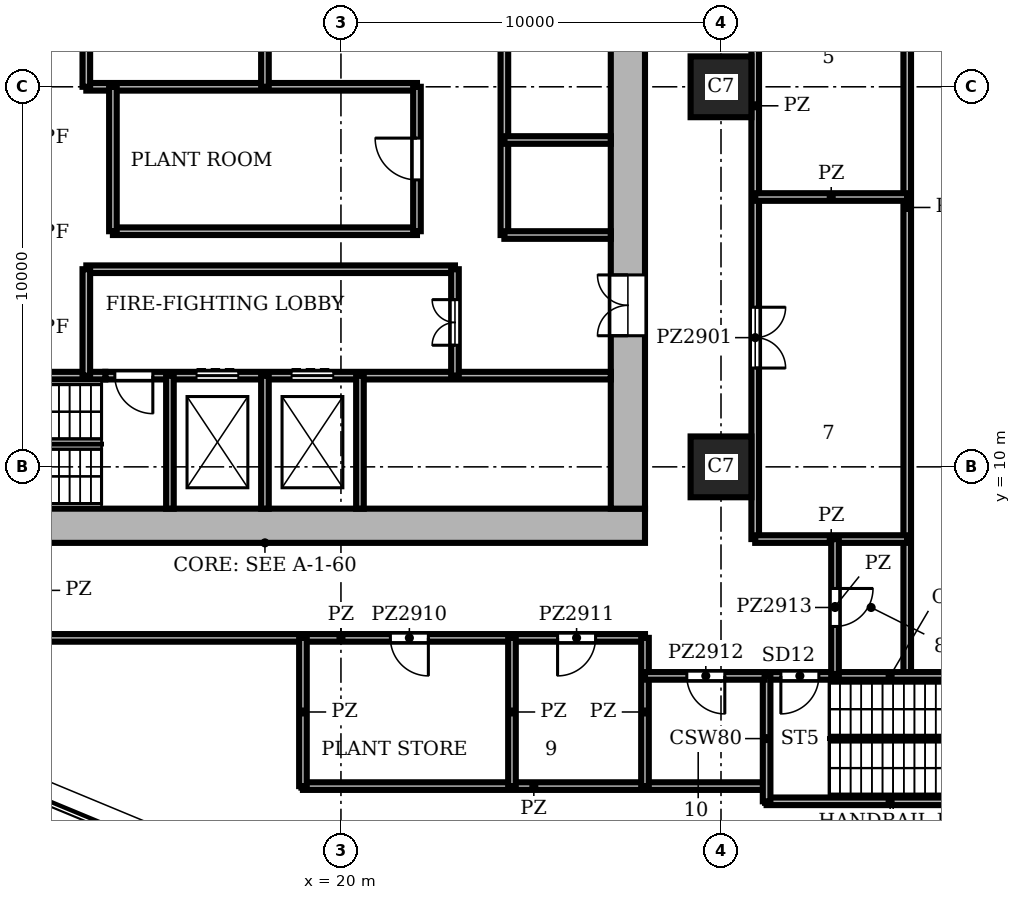
"""IFC4 building model, lengths in metres.
Left out: names, types, materials, properties, quantities, classifications, styles, units other than length and angle.
Written with IfcOpenShell. Run it as: python <this file> out.ifc"""

import sys

from ifc_helpers import new_model, si_unit, direction, frame, frame_2d, origin, origin_2d, place, context, subcontext, project, spatial, rectangle, extrude, element, fill, save


model = new_model("IFC4")
c1 = context("Model", 3, precision=1e-05, world=origin(), true_north=direction((0.0, 1.0)))
c2 = subcontext(c1, "Body", "Model", "MODEL_VIEW")
j1 = project(units=[si_unit("LENGTHUNIT", "METRE"), si_unit("PLANEANGLEUNIT", "RADIAN")], contexts=[c1])
p1 = place(None, origin())
s1 = spatial("IfcSite", under=j1, at=p1, CompositionType="ELEMENT")
p2 = place(p1, origin())
s2 = spatial("IfcBuilding", under=s1, at=p2, CompositionType="ELEMENT")
p3 = place(p2, frame((0.0, 0.0, 117.3)))
s3 = spatial("IfcBuildingStorey", under=s2, at=p3, CompositionType="ELEMENT", Elevation=117.3)
for number, where, z_axis, x_axis in (
    (1, (30.0, 10.0, 0.0), (0.0, 0.0, 1.0), (1.0, 0.0, 0.0)),
    (2, (30.0, 20.0, 0.0), (0.0, 0.0, 1.0), (1.0, 0.0, 0.0)),
):
    element("IfcColumn", number, at=place(p3, frame(where, z_axis=z_axis, x_axis=x_axis)), inside=s3, PredefinedType="COLUMN", context=c2, shape_type="SweptSolid", body=[
        extrude(rectangle(XDim=1.6, YDim=1.6, at=origin_2d()), origin(), (0.0, 0.0, 1.0), 9.0),
    ])
p4 = place(p3, frame((8.0, 8.45, 0.0), z_axis=(0.0, 0.0, 1.0), x_axis=(1.0, 0.0, 0.0)))
e3 = element("IfcWall", 3, at=p4, inside=s3, PredefinedType="SHEAR", context=c2, shape_type="SweptSolid", body=[
    extrude(rectangle(XDim=20.0, YDim=0.9, at=frame_2d((10.0, 0.0))), origin(), (0.0, 0.0, 1.0), 9.0),
])
p5 = place(p3, frame((27.55, 8.9, 0.0), z_axis=(0.0, 0.0, 1.0), x_axis=(0.0, 1.0, 0.0)))
e4 = element("IfcWall", 4, at=p5, inside=s3, PredefinedType="SHEAR", context=c2, shape_type="SweptSolid", body=[
    extrude(rectangle(XDim=18.2, YDim=0.9, at=frame_2d((9.1, 0.0))), origin(), (0.0, 0.0, 1.0), 9.0),
])
p6 = place(p5, frame((4.55, 0.0, 0.0)))
e5 = element("IfcOpeningElement", 5, at=p6, cuts=e4, PredefinedType="OPENING", context=c2, shape_type="SweptSolid", body=[
    extrude(rectangle(XDim=1.6, YDim=2.1, at=frame_2d((0.8, 1.05))), frame((0.0, 0.46, 0.0), z_axis=(0.0, -1.0, 0.0), x_axis=(1.0, 0.0, 0.0)), (0.0, 0.0, 1.0), 0.92),
])
p7 = place(p3, frame((31.2, 1.2, 0.0), z_axis=(0.0, 0.0, 1.0), x_axis=(1.0, 0.0, 0.0)))
e6 = element("IfcWall", 6, at=p7, inside=s3, PredefinedType="SHEAR", context=c2, shape_type="SweptSolid", body=[
    extrude(rectangle(XDim=6.5, YDim=0.2, at=frame_2d((3.25, 0.0))), origin(), (0.0, 0.0, 1.0), 8.55),
])
p8 = place(p3, frame((31.2, 4.5, 0.0), z_axis=(0.0, 0.0, 1.0), x_axis=(1.0, 0.0, 0.0)))
e7 = element("IfcWall", 7, at=p8, inside=s3, PredefinedType="SHEAR", context=c2, shape_type="SweptSolid", body=[
    extrude(rectangle(XDim=6.5, YDim=0.2, at=frame_2d((3.25, 0.0))), origin(), (0.0, 0.0, 1.0), 8.55),
])
p9 = place(p8, frame((0.375, 0.0, 0.0)))
e8 = element("IfcOpeningElement", 8, at=p9, cuts=e7, PredefinedType="OPENING", context=c2, shape_type="SweptSolid", body=[
    extrude(rectangle(XDim=1.0, YDim=2.1, at=frame_2d((0.5, 1.05))), frame((0.0, 0.11, 0.0), z_axis=(0.0, -1.0, 0.0), x_axis=(1.0, 0.0, 0.0)), (0.0, 0.0, 1.0), 0.22),
])
p10 = place(p3, frame((8.9, 12.4, 0.0), z_axis=(0.0, 0.0, 1.0), x_axis=(1.0, 0.0, 0.0)))
e9 = element("IfcWall", 9, at=p10, inside=s3, PredefinedType="SHEAR", context=c2, shape_type="SweptSolid", body=[
    extrude(rectangle(XDim=4.9, YDim=0.2, at=frame_2d((2.45, 0.0))), origin(), (0.0, 0.0, 1.0), 8.55),
])
p11 = place(p3, frame((13.8, 12.4, 0.0), z_axis=(0.0, 0.0, 1.0), x_axis=(1.0, 0.0, 0.0)))
e10 = element("IfcWall", 10, at=p11, inside=s3, PredefinedType="SHEAR", context=c2, shape_type="SweptSolid", body=[
    extrude(rectangle(XDim=13.3, YDim=0.2, at=frame_2d((6.65, 0.0))), origin(), (0.0, 0.0, 1.0), 8.55),
])
p12 = place(p11, frame((2.4, 0.0, 0.0)))
e11 = element("IfcOpeningElement", 11, at=p12, cuts=e10, PredefinedType="OPENING", context=c2, shape_type="SweptSolid", body=[
    extrude(rectangle(XDim=1.1, YDim=2.1, at=frame_2d((0.55, 1.05))), frame((0.0, 0.11, 0.0), z_axis=(0.0, -1.0, 0.0), x_axis=(1.0, 0.0, 0.0)), (0.0, 0.0, 1.0), 0.22),
])
p13 = place(p11, frame((4.9, 0.0, 0.0)))
e12 = element("IfcOpeningElement", 12, at=p13, cuts=e10, PredefinedType="OPENING", context=c2, shape_type="SweptSolid", body=[
    extrude(rectangle(XDim=1.1, YDim=2.1, at=frame_2d((0.55, 1.05))), frame((0.0, 0.11, 0.0), z_axis=(0.0, -1.0, 0.0), x_axis=(1.0, 0.0, 0.0)), (0.0, 0.0, 1.0), 0.22),
])
p14 = place(p11, frame((0.25, 0.0, 0.0)))
e13 = element("IfcOpeningElement", 13, at=p14, cuts=e10, PredefinedType="OPENING", context=c2, shape_type="SweptSolid", body=[
    extrude(rectangle(XDim=1.0, YDim=2.1, at=frame_2d((0.5, 1.05))), frame((0.0, 0.11, 0.0), z_axis=(0.0, -1.0, 0.0), x_axis=(1.0, 0.0, 0.0)), (0.0, 0.0, 1.0), 0.22),
])
p15 = place(p3, frame((13.3, 15.2, 0.0), z_axis=(0.0, 0.0, 1.0), x_axis=(1.0, 0.0, 0.0)))
e14 = element("IfcWall", 14, at=p15, inside=s3, PredefinedType="SHEAR", context=c2, shape_type="SweptSolid", body=[
    extrude(rectangle(XDim=9.7, YDim=0.2, at=frame_2d((4.85, 0.0))), origin(), (0.0, 0.0, 1.0), 8.55),
])
p16 = place(p3, frame((24.3, 16.1, 0.0), z_axis=(0.0, 0.0, 1.0), x_axis=(1.0, 0.0, 0.0)))
e15 = element("IfcWall", 15, at=p16, inside=s3, PredefinedType="SHEAR", context=c2, shape_type="SweptSolid", body=[
    extrude(rectangle(XDim=2.8, YDim=0.2, at=frame_2d((1.4, 0.0))), origin(), (0.0, 0.0, 1.0), 8.55),
])
p17 = place(p3, frame((14.0, 16.2, 0.0), z_axis=(0.0, 0.0, 1.0), x_axis=(1.0, 0.0, 0.0)))
e16 = element("IfcWall", 16, at=p17, inside=s3, PredefinedType="SHEAR", context=c2, shape_type="SweptSolid", body=[
    extrude(rectangle(XDim=8.0, YDim=0.2, at=frame_2d((4.0, 0.0))), origin(), (0.0, 0.0, 1.0), 8.55),
])
p18 = place(p3, frame((24.3, 18.6, 0.0), z_axis=(0.0, 0.0, 1.0), x_axis=(1.0, 0.0, 0.0)))
e17 = element("IfcWall", 17, at=p18, inside=s3, PredefinedType="SHEAR", context=c2, shape_type="SweptSolid", body=[
    extrude(rectangle(XDim=2.8, YDim=0.2, at=frame_2d((1.4, 0.0))), origin(), (0.0, 0.0, 1.0), 8.55),
])
p19 = place(p3, frame((13.3, 20.0, 0.0), z_axis=(0.0, 0.0, 1.0), x_axis=(1.0, 0.0, 0.0)))
e18 = element("IfcWall", 18, at=p19, inside=s3, PredefinedType="SHEAR", context=c2, shape_type="SweptSolid", body=[
    extrude(rectangle(XDim=8.7, YDim=0.2, at=frame_2d((4.35, 0.0))), origin(), (0.0, 0.0, 1.0), 8.55),
])
p20 = place(p3, frame((13.3, 12.4, 0.0), z_axis=(0.0, 0.0, 1.0), x_axis=(0.0, 1.0, 0.0)))
e19 = element("IfcWall", 19, at=p20, inside=s3, PredefinedType="SHEAR", context=c2, shape_type="SweptSolid", body=[
    extrude(rectangle(XDim=2.8, YDim=0.2, at=frame_2d((1.4, 0.0))), origin(), (0.0, 0.0, 1.0), 8.55),
])
p21 = place(p3, frame((13.3, 20.0, 0.0), z_axis=(0.0, 0.0, 1.0), x_axis=(0.0, 1.0, 0.0)))
e20 = element("IfcWall", 20, at=p21, inside=s3, PredefinedType="SHEAR", context=c2, shape_type="SweptSolid", body=[
    extrude(rectangle(XDim=3.6, YDim=0.2, at=frame_2d((1.8, 0.0))), origin(), (0.0, 0.0, 1.0), 8.55),
])
p22 = place(p3, frame((14.0, 16.2, 0.0), z_axis=(0.0, 0.0, 1.0), x_axis=(0.0, 1.0, 0.0)))
e21 = element("IfcWall", 21, at=p22, inside=s3, PredefinedType="SHEAR", context=c2, shape_type="SweptSolid", body=[
    extrude(rectangle(XDim=3.8, YDim=0.2, at=frame_2d((1.9, 0.0))), origin(), (0.0, 0.0, 1.0), 8.55),
])
for number, where, z_axis, x_axis in (
    (22, (15.5, 8.9, 0.0), (0.0, 0.0, 1.0), (0.0, 1.0, 0.0)),
    (23, (18.0, 8.9, 0.0), (0.0, 0.0, 1.0), (0.0, 1.0, 0.0)),
):
    element("IfcWall", number, at=place(p3, frame(where, z_axis=z_axis, x_axis=x_axis)), inside=s3, PredefinedType="SHEAR", context=c2, shape_type="SweptSolid", body=[
        extrude(rectangle(XDim=3.5, YDim=0.2, at=frame_2d((1.75, 0.0))), origin(), (0.0, 0.0, 1.0), 8.55),
    ])
p23 = place(p3, frame((18.0, 20.0, 0.0), z_axis=(0.0, 0.0, 1.0), x_axis=(0.0, 1.0, 0.0)))
e24 = element("IfcWall", 24, at=p23, inside=s3, PredefinedType="SHEAR", context=c2, shape_type="SweptSolid", body=[
    extrude(rectangle(XDim=7.1, YDim=0.2, at=frame_2d((3.55, 0.0))), origin(), (0.0, 0.0, 1.0), 8.55),
])
p24 = place(p23, frame((1.2, 0.0, 0.0)))
e25 = element("IfcOpeningElement", 25, at=p24, cuts=e24, PredefinedType="OPENING", context=c2, shape_type="SweptSolid", body=[
    extrude(rectangle(XDim=1.2, YDim=2.1, at=frame_2d((0.6, 1.05))), frame((0.0, 0.11, 0.0), z_axis=(0.0, -1.0, 0.0), x_axis=(1.0, 0.0, 0.0)), (0.0, 0.0, 1.0), 0.22),
])
p25 = place(p3, frame((20.5, 8.9, 0.0), z_axis=(0.0, 0.0, 1.0), x_axis=(0.0, 1.0, 0.0)))
e26 = element("IfcWall", 26, at=p25, inside=s3, PredefinedType="SHEAR", context=c2, shape_type="SweptSolid", body=[
    extrude(rectangle(XDim=3.5, YDim=0.2, at=frame_2d((1.75, 0.0))), origin(), (0.0, 0.0, 1.0), 8.55),
])
p26 = place(p3, frame((22.0, 16.2, 0.0), z_axis=(0.0, 0.0, 1.0), x_axis=(0.0, 1.0, 0.0)))
e27 = element("IfcWall", 27, at=p26, inside=s3, PredefinedType="SHEAR", context=c2, shape_type="SweptSolid", body=[
    extrude(rectangle(XDim=3.8, YDim=0.2, at=frame_2d((1.9, 0.0))), origin(), (0.0, 0.0, 1.0), 8.55),
])
p27 = place(p26, frame((1.35, 0.0, 0.0)))
e28 = element("IfcOpeningElement", 28, at=p27, cuts=e27, PredefinedType="OPENING", context=c2, shape_type="SweptSolid", body=[
    extrude(rectangle(XDim=1.1, YDim=2.1, at=frame_2d((0.55, 1.05))), frame((0.0, 0.11, 0.0), z_axis=(0.0, -1.0, 0.0), x_axis=(1.0, 0.0, 0.0)), (0.0, 0.0, 1.0), 0.22),
])
p28 = place(p3, frame((23.0, 12.4, 0.0), z_axis=(0.0, 0.0, 1.0), x_axis=(0.0, 1.0, 0.0)))
e29 = element("IfcWall", 29, at=p28, inside=s3, PredefinedType="SHEAR", context=c2, shape_type="SweptSolid", body=[
    extrude(rectangle(XDim=2.8, YDim=0.2, at=frame_2d((1.4, 0.0))), origin(), (0.0, 0.0, 1.0), 8.55),
])
p29 = place(p28, frame((0.8, 0.0, 0.0)))
e30 = element("IfcOpeningElement", 30, at=p29, cuts=e29, PredefinedType="OPENING", context=c2, shape_type="SweptSolid", body=[
    extrude(rectangle(XDim=1.2, YDim=2.1, at=frame_2d((0.6, 1.05))), frame((0.0, 0.11, 0.0), z_axis=(0.0, -1.0, 0.0), x_axis=(1.0, 0.0, 0.0)), (0.0, 0.0, 1.0), 0.22),
])
p30 = place(p3, frame((24.3, 16.1, 0.0), z_axis=(0.0, 0.0, 1.0), x_axis=(0.0, 1.0, 0.0)))
e31 = element("IfcWall", 31, at=p30, inside=s3, PredefinedType="SHEAR", context=c2, shape_type="SweptSolid", body=[
    extrude(rectangle(XDim=7.5, YDim=0.2, at=frame_2d((3.75, 0.0))), origin(), (0.0, 0.0, 1.0), 8.55),
])
p31 = place(p30, frame((5.7, 0.0, 0.0)))
e32 = element("IfcOpeningElement", 32, at=p31, cuts=e31, PredefinedType="OPENING", context=c2, shape_type="SweptSolid", body=[
    extrude(rectangle(XDim=1.1, YDim=2.1, at=frame_2d((0.55, 1.05))), frame((0.0, 0.11, 0.0), z_axis=(0.0, -1.0, 0.0), x_axis=(1.0, 0.0, 0.0)), (0.0, 0.0, 1.0), 0.22),
])
p32 = place(p3, frame((31.2, 1.2, 0.0), z_axis=(0.0, 0.0, 1.0), x_axis=(0.0, 1.0, 0.0)))
e33 = element("IfcWall", 33, at=p32, inside=s3, PredefinedType="SHEAR", context=c2, shape_type="SweptSolid", body=[
    extrude(rectangle(XDim=3.3, YDim=0.2, at=frame_2d((1.65, 0.0))), origin(), (0.0, 0.0, 1.0), 8.55),
])
p33 = place(p3, frame((12.0, 5.5, 0.0), z_axis=(0.0, 0.0, 1.0), x_axis=(1.0, 0.0, 0.0)))
e34 = element("IfcWall", 34, at=p33, inside=s3, PredefinedType="PARTITIONING", context=c2, shape_type="SweptSolid", body=[
    extrude(rectangle(XDim=16.0, YDim=0.2, at=frame_2d((8.0, 0.0))), origin(), (0.0, 0.0, 1.0), 8.55),
])
p34 = place(p33, frame((9.3, 0.0, 0.0)))
e35 = element("IfcOpeningElement", 35, at=p34, cuts=e34, PredefinedType="OPENING", context=c2, shape_type="SweptSolid", body=[
    extrude(rectangle(XDim=1.0, YDim=2.1, at=frame_2d((0.5, 1.05))), frame((0.0, 0.11, 0.0), z_axis=(0.0, -1.0, 0.0), x_axis=(1.0, 0.0, 0.0)), (0.0, 0.0, 1.0), 0.22),
])
p35 = place(p33, frame((13.7, 0.0, 0.0)))
e36 = element("IfcOpeningElement", 36, at=p35, cuts=e34, PredefinedType="OPENING", context=c2, shape_type="SweptSolid", body=[
    extrude(rectangle(XDim=1.0, YDim=2.1, at=frame_2d((0.5, 1.05))), frame((0.0, 0.11, 0.0), z_axis=(0.0, -1.0, 0.0), x_axis=(1.0, 0.0, 0.0)), (0.0, 0.0, 1.0), 0.22),
])
p36 = place(p3, frame((19.0, 1.6, 0.0), z_axis=(0.0, 0.0, 1.0), x_axis=(1.0, 0.0, 0.0)))
e37 = element("IfcWall", 37, at=p36, inside=s3, PredefinedType="PARTITIONING", context=c2, shape_type="SweptSolid", body=[
    extrude(rectangle(XDim=12.15, YDim=0.2, at=frame_2d((6.075, 0.0))), origin(), (0.0, 0.0, 1.0), 8.55),
])
p37 = place(p3, frame((28.0, 4.5, 0.0), z_axis=(0.0, 0.0, 1.0), x_axis=(1.0, 0.0, 0.0)))
e38 = element("IfcWall", 38, at=p37, inside=s3, PredefinedType="PARTITIONING", context=c2, shape_type="SweptSolid", body=[
    extrude(rectangle(XDim=3.15, YDim=0.2, at=frame_2d((1.575, 0.0))), origin(), (0.0, 0.0, 1.0), 8.55),
])
p38 = place(p37, frame((1.1, 0.0, 0.0)))
e39 = element("IfcOpeningElement", 39, at=p38, cuts=e38, PredefinedType="OPENING", context=c2, shape_type="SweptSolid", body=[
    extrude(rectangle(XDim=1.0, YDim=2.1, at=frame_2d((0.5, 1.05))), frame((0.0, 0.11, 0.0), z_axis=(0.0, -1.0, 0.0), x_axis=(1.0, 0.0, 0.0)), (0.0, 0.0, 1.0), 0.22),
])
for number, where, z_axis, x_axis in (
    (40, (30.9, 8.1, 0.0), (0.0, 0.0, 1.0), (1.0, 0.0, 0.0)),
    (41, (30.9, 17.1, 0.0), (0.0, 0.0, 1.0), (1.0, 0.0, 0.0)),
):
    element("IfcWall", number, at=place(p3, frame(where, z_axis=z_axis, x_axis=x_axis)), inside=s3, PredefinedType="PARTITIONING", context=c2, shape_type="SweptSolid", body=[
        extrude(rectangle(XDim=4.0, YDim=0.2, at=frame_2d((2.0, 0.0))), origin(), (0.0, 0.0, 1.0), 8.55),
    ])
for number, where, z_axis, x_axis in (
    (42, (19.0, 1.6, 0.0), (0.0, 0.0, 1.0), (0.0, 1.0, 0.0)),
    (43, (24.5, 1.6, 0.0), (0.0, 0.0, 1.0), (0.0, 1.0, 0.0)),
    (44, (28.0, 1.6, 0.0), (0.0, 0.0, 1.0), (0.0, 1.0, 0.0)),
):
    element("IfcWall", number, at=place(p3, frame(where, z_axis=z_axis, x_axis=x_axis)), inside=s3, PredefinedType="PARTITIONING", context=c2, shape_type="SweptSolid", body=[
        extrude(rectangle(XDim=3.9, YDim=0.2, at=frame_2d((1.95, 0.0))), origin(), (0.0, 0.0, 1.0), 8.55),
    ])
p39 = place(p3, frame((30.9, 8.1, 0.0), z_axis=(0.0, 0.0, 1.0), x_axis=(0.0, 1.0, 0.0)))
e45 = element("IfcWall", 45, at=p39, inside=s3, PredefinedType="PARTITIONING", context=c2, shape_type="SweptSolid", body=[
    extrude(rectangle(XDim=22.8, YDim=0.2, at=frame_2d((11.4, 0.0))), origin(), (0.0, 0.0, 1.0), 8.55),
])
p40 = place(p39, frame((4.5, 0.0, 0.0)))
e46 = element("IfcOpeningElement", 46, at=p40, cuts=e45, PredefinedType="OPENING", context=c2, shape_type="SweptSolid", body=[
    extrude(rectangle(XDim=1.6, YDim=2.1, at=frame_2d((0.8, 1.05))), frame((0.0, 0.11, 0.0), z_axis=(0.0, -1.0, 0.0), x_axis=(1.0, 0.0, 0.0)), (0.0, 0.0, 1.0), 0.22),
])
p41 = place(p39, frame((13.5, 0.0, 0.0)))
e47 = element("IfcOpeningElement", 47, at=p41, cuts=e45, PredefinedType="OPENING", context=c2, shape_type="SweptSolid", body=[
    extrude(rectangle(XDim=1.2, YDim=2.1, at=frame_2d((0.6, 1.05))), frame((0.0, 0.11, 0.0), z_axis=(0.0, -1.0, 0.0), x_axis=(1.0, 0.0, 0.0)), (0.0, 0.0, 1.0), 0.22),
])
p42 = place(p39, frame((17.6, 0.0, 0.0)))
e48 = element("IfcOpeningElement", 48, at=p42, cuts=e45, PredefinedType="OPENING", context=c2, shape_type="SweptSolid", body=[
    extrude(rectangle(XDim=1.0, YDim=2.1, at=frame_2d((0.5, 1.05))), frame((0.0, 0.11, 0.0), z_axis=(0.0, -1.0, 0.0), x_axis=(1.0, 0.0, 0.0)), (0.0, 0.0, 1.0), 0.22),
])
p43 = place(p3, frame((33.0, 4.55, 0.0), z_axis=(0.0, 0.0, 1.0), x_axis=(0.0, 1.0, 0.0)))
e49 = element("IfcWall", 49, at=p43, inside=s3, PredefinedType="PARTITIONING", context=c2, shape_type="SweptSolid", body=[
    extrude(rectangle(XDim=3.55, YDim=0.2, at=frame_2d((1.775, 0.0))), origin(), (0.0, 0.0, 1.0), 8.55),
])
p44 = place(p43, frame((1.25, 0.0, 0.0)))
e50 = element("IfcOpeningElement", 50, at=p44, cuts=e49, PredefinedType="OPENING", context=c2, shape_type="SweptSolid", body=[
    extrude(rectangle(XDim=1.0, YDim=2.1, at=frame_2d((0.5, 1.05))), frame((0.0, 0.11, 0.0), z_axis=(0.0, -1.0, 0.0), x_axis=(1.0, 0.0, 0.0)), (0.0, 0.0, 1.0), 0.22),
])
p45 = place(p3, frame((34.9, 4.55, 0.0), z_axis=(0.0, 0.0, 1.0), x_axis=(0.0, 1.0, 0.0)))
e51 = element("IfcWall", 51, at=p45, inside=s3, PredefinedType="PARTITIONING", context=c2, shape_type="SweptSolid", body=[
    extrude(rectangle(XDim=24.55, YDim=0.2, at=frame_2d((12.275, 0.0))), origin(), (0.0, 0.0, 1.0), 8.55),
])
p46 = place(p12, origin())
e52 = element("IfcDoor", 52, at=p46, inside=s3, OperationType="DOUBLE_DOOR_SLIDING", PredefinedType="DOOR", context=c2, shape_type="SweptSolid", body=[
    extrude(rectangle(XDim=1.1, YDim=2.1, at=frame_2d((0.55, 1.05))), frame((0.0, 0.025, 0.0), z_axis=(0.0, -1.0, 0.0), x_axis=(1.0, 0.0, 0.0)), (0.0, 0.0, 1.0), 0.05),
])
fill(e11, e52)
p47 = place(p13, origin())
e53 = element("IfcDoor", 53, at=p47, inside=s3, OperationType="DOUBLE_DOOR_SLIDING", PredefinedType="DOOR", context=c2, shape_type="SweptSolid", body=[
    extrude(rectangle(XDim=1.1, YDim=2.1, at=frame_2d((0.55, 1.05))), frame((0.0, 0.025, 0.0), z_axis=(0.0, -1.0, 0.0), x_axis=(1.0, 0.0, 0.0)), (0.0, 0.0, 1.0), 0.05),
])
fill(e12, e53)
p48 = place(p14, frame((1.0, 0.0, 0.0), z_axis=(0.0, 0.0, 1.0), x_axis=(-1.0, 0.0, 0.0)))
e54 = element("IfcDoor", 54, at=p48, inside=s3, OperationType="SINGLE_SWING_LEFT", PredefinedType="DOOR", context=c2, shape_type="SweptSolid", body=[
    extrude(rectangle(XDim=1.0, YDim=2.1, at=frame_2d((0.5, 1.05))), frame((0.0, 0.025, 0.0), z_axis=(0.0, -1.0, 0.0), x_axis=(1.0, 0.0, 0.0)), (0.0, 0.0, 1.0), 0.05),
])
fill(e13, e54)
p49 = place(p9, frame((1.0, 0.0, 0.0), z_axis=(0.0, 0.0, 1.0), x_axis=(-1.0, 0.0, 0.0)))
e55 = element("IfcDoor", 55, at=p49, inside=s3, OperationType="SINGLE_SWING_RIGHT", PredefinedType="DOOR", context=c2, shape_type="SweptSolid", body=[
    extrude(rectangle(XDim=1.0, YDim=2.1, at=frame_2d((0.5, 1.05))), frame((0.0, 0.025, 0.0), z_axis=(0.0, -1.0, 0.0), x_axis=(1.0, 0.0, 0.0)), (0.0, 0.0, 1.0), 0.05),
])
fill(e8, e55)
p50 = place(p29, origin())
e56 = element("IfcDoor", 56, at=p50, inside=s3, OperationType="DOUBLE_DOOR_SINGLE_SWING", PredefinedType="DOOR", context=c2, shape_type="SweptSolid", body=[
    extrude(rectangle(XDim=1.2, YDim=2.1, at=frame_2d((0.6, 1.05))), frame((0.0, 0.025, 0.0), z_axis=(0.0, -1.0, 0.0), x_axis=(1.0, 0.0, 0.0)), (0.0, 0.0, 1.0), 0.05),
])
fill(e30, e56)
p51 = place(p27, origin())
e57 = element("IfcDoor", 57, at=p51, inside=s3, OperationType="SINGLE_SWING_RIGHT", PredefinedType="DOOR", context=c2, shape_type="SweptSolid", body=[
    extrude(rectangle(XDim=1.1, YDim=2.1, at=frame_2d((0.55, 1.05))), frame((0.0, 0.025, 0.0), z_axis=(0.0, -1.0, 0.0), x_axis=(1.0, 0.0, 0.0)), (0.0, 0.0, 1.0), 0.05),
])
fill(e28, e57)
p52 = place(p6, origin())
e58 = element("IfcDoor", 58, at=p52, inside=s3, OperationType="DOUBLE_DOOR_SINGLE_SWING", PredefinedType="DOOR", context=c2, shape_type="SweptSolid", body=[
    extrude(rectangle(XDim=1.6, YDim=2.1, at=frame_2d((0.8, 1.05))), frame((0.0, 0.025, 0.0), z_axis=(0.0, -1.0, 0.0), x_axis=(1.0, 0.0, 0.0)), (0.0, 0.0, 1.0), 0.05),
])
fill(e5, e58)
p53 = place(p40, frame((1.6, 0.0, 0.0), z_axis=(0.0, 0.0, 1.0), x_axis=(-1.0, 0.0, 0.0)))
e59 = element("IfcDoor", 59, at=p53, inside=s3, OperationType="DOUBLE_DOOR_DOUBLE_SWING", PredefinedType="DOOR", context=c2, shape_type="SweptSolid", body=[
    extrude(rectangle(XDim=1.6, YDim=2.1, at=frame_2d((0.8, 1.05))), frame((0.0, 0.025, 0.0), z_axis=(0.0, -1.0, 0.0), x_axis=(1.0, 0.0, 0.0)), (0.0, 0.0, 1.0), 0.05),
])
fill(e46, e59)
p54 = place(p34, frame((1.0, 0.0, 0.0), z_axis=(0.0, 0.0, 1.0), x_axis=(-1.0, 0.0, 0.0)))
e60 = element("IfcDoor", 60, at=p54, inside=s3, OperationType="SINGLE_SWING_LEFT", PredefinedType="DOOR", context=c2, shape_type="SweptSolid", body=[
    extrude(rectangle(XDim=1.0, YDim=2.1, at=frame_2d((0.5, 1.05))), frame((0.0, 0.025, 0.0), z_axis=(0.0, -1.0, 0.0), x_axis=(1.0, 0.0, 0.0)), (0.0, 0.0, 1.0), 0.05),
])
fill(e35, e60)
p55 = place(p35, frame((1.0, 0.0, 0.0), z_axis=(0.0, 0.0, 1.0), x_axis=(-1.0, 0.0, 0.0)))
e61 = element("IfcDoor", 61, at=p55, inside=s3, OperationType="SINGLE_SWING_RIGHT", PredefinedType="DOOR", context=c2, shape_type="SweptSolid", body=[
    extrude(rectangle(XDim=1.0, YDim=2.1, at=frame_2d((0.5, 1.05))), frame((0.0, 0.025, 0.0), z_axis=(0.0, -1.0, 0.0), x_axis=(1.0, 0.0, 0.0)), (0.0, 0.0, 1.0), 0.05),
])
fill(e36, e61)
p56 = place(p38, frame((1.0, 0.0, 0.0), z_axis=(0.0, 0.0, 1.0), x_axis=(-1.0, 0.0, 0.0)))
e62 = element("IfcDoor", 62, at=p56, inside=s3, OperationType="SINGLE_SWING_LEFT", PredefinedType="DOOR", context=c2, shape_type="SweptSolid", body=[
    extrude(rectangle(XDim=1.0, YDim=2.1, at=frame_2d((0.5, 1.05))), frame((0.0, 0.025, 0.0), z_axis=(0.0, -1.0, 0.0), x_axis=(1.0, 0.0, 0.0)), (0.0, 0.0, 1.0), 0.05),
])
fill(e39, e62)
p57 = place(p44, frame((1.0, 0.0, 0.0), z_axis=(0.0, 0.0, 1.0), x_axis=(-1.0, 0.0, 0.0)))
e63 = element("IfcDoor", 63, at=p57, inside=s3, OperationType="SINGLE_SWING_LEFT", PredefinedType="DOOR", context=c2, shape_type="SweptSolid", body=[
    extrude(rectangle(XDim=1.0, YDim=2.1, at=frame_2d((0.5, 1.05))), frame((0.0, 0.025, 0.0), z_axis=(0.0, -1.0, 0.0), x_axis=(1.0, 0.0, 0.0)), (0.0, 0.0, 1.0), 0.05),
])
fill(e50, e63)
save(model, sys.argv[1])
